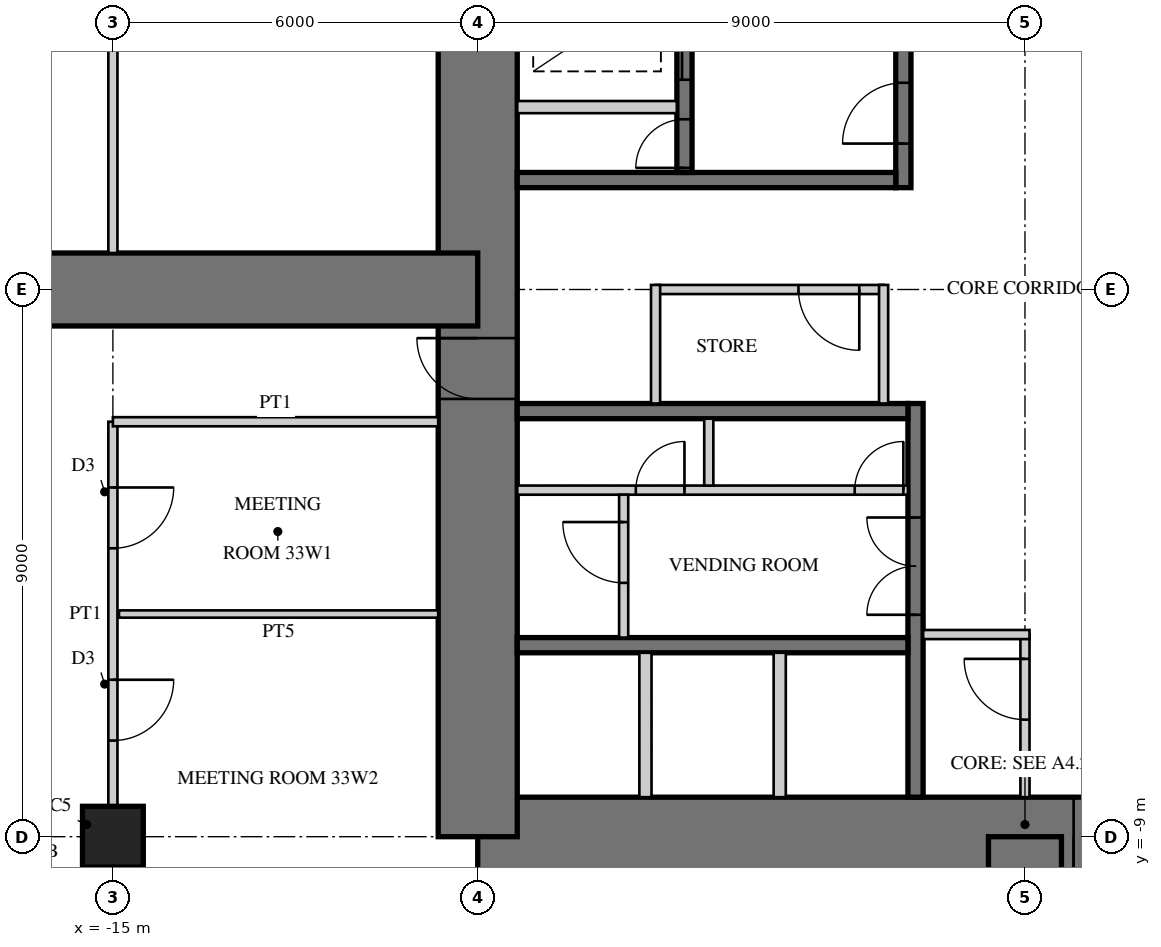
"""IFC4 building model, lengths in metres.
Left out: names, types, materials, properties, quantities, classifications, styles, units other than length and angle.
Written with IfcOpenShell. Run it as: python <this file> out.ifc"""

import sys

from ifc_helpers import new_model, si_unit, direction, frame, frame_2d, origin, origin_2d, place, context, subcontext, project, spatial, rectangle, extrude, element, fill, save


model = new_model("IFC4")
c1 = context("Model", 3, precision=1e-05, world=origin(), true_north=direction((0.0, 1.0)))
c2 = subcontext(c1, "Body", "Model", "MODEL_VIEW")
j1 = project(units=[si_unit("LENGTHUNIT", "METRE"), si_unit("PLANEANGLEUNIT", "RADIAN")], contexts=[c1])
p1 = place(None, origin())
s1 = spatial("IfcSite", under=j1, at=p1, CompositionType="ELEMENT")
p2 = place(p1, origin())
s2 = spatial("IfcBuilding", under=s1, at=p2, CompositionType="ELEMENT")
p3 = place(p2, frame((0.0, 0.0, 136.5)))
s3 = spatial("IfcBuildingStorey", under=s2, at=p3, CompositionType="ELEMENT", Elevation=136.5)
p4 = place(p3, frame((-9.0, -9.0, 0.0), z_axis=(0.0, 0.0, 1.0), x_axis=(1.0, 0.0, 0.0)))
e1 = element("IfcWall", 1, at=p4, inside=s3, PredefinedType="SHEAR", context=c2, shape_type="SweptSolid", body=[
    extrude(rectangle(XDim=18.0, YDim=1.3, at=frame_2d((9.0, 0.0))), origin(), (0.0, 0.0, 1.0), 4.0),
])
p5 = place(p4, frame((9.8, 0.0, 0.0)))
e2 = element("IfcOpeningElement", 2, at=p5, cuts=e1, PredefinedType="OPENING", context=c2, shape_type="SweptSolid", body=[
    extrude(rectangle(XDim=1.0, YDim=2.4, at=frame_2d((0.5, 1.2))), frame((0.0, 0.66, 0.0), z_axis=(0.0, -1.0, 0.0), x_axis=(1.0, 0.0, 0.0)), (0.0, 0.0, 1.0), 1.32),
])
p6 = place(p3, frame((-9.0, 9.0, 0.0), z_axis=(0.0, 0.0, 1.0), x_axis=(0.0, -1.0, 0.0)))
e3 = element("IfcWall", 3, at=p6, inside=s3, PredefinedType="SHEAR", context=c2, shape_type="SweptSolid", body=[
    extrude(rectangle(XDim=18.0, YDim=1.3, at=frame_2d((9.0, 0.0))), origin(), (0.0, 0.0, 1.0), 4.0),
])
p7 = place(p6, frame((9.8, 0.0, 0.0)))
e4 = element("IfcOpeningElement", 4, at=p7, cuts=e3, PredefinedType="OPENING", context=c2, shape_type="SweptSolid", body=[
    extrude(rectangle(XDim=1.0, YDim=2.4, at=frame_2d((0.5, 1.2))), frame((0.0, 0.66, 0.0), z_axis=(0.0, -1.0, 0.0), x_axis=(1.0, 0.0, 0.0)), (0.0, 0.0, 1.0), 1.32),
])
p8 = place(p3, frame((-2.0, 1.675, 0.0), z_axis=(0.0, 0.0, 1.0), x_axis=(0.0, 1.0, 0.0)))
e5 = element("IfcWall", 5, at=p8, inside=s3, PredefinedType="SHEAR", context=c2, shape_type="SweptSolid", body=[
    extrude(rectangle(XDim=6.675, YDim=0.25, at=frame_2d((3.337, 0.0))), origin(), (0.0, 0.0, 1.0), 4.0),
])
p9 = place(p8, frame((0.725, 0.0, 0.0)))
e6 = element("IfcOpeningElement", 6, at=p9, cuts=e5, PredefinedType="OPENING", context=c2, shape_type="SweptSolid", body=[
    extrude(rectangle(XDim=1.0, YDim=2.1, at=frame_2d((0.5, 1.05))), frame((0.0, 0.135, 0.0), z_axis=(0.0, -1.0, 0.0), x_axis=(1.0, 0.0, 0.0)), (0.0, 0.0, 1.0), 0.27),
])
p10 = place(p3, frame((-2.125, 1.8, 0.0), z_axis=(0.0, 0.0, 1.0), x_axis=(-1.0, 0.0, 0.0)))
e7 = element("IfcWall", 7, at=p10, inside=s3, PredefinedType="SHEAR", context=c2, shape_type="SweptSolid", body=[
    extrude(rectangle(XDim=6.225, YDim=0.25, at=frame_2d((3.113, 0.0))), origin(), (0.0, 0.0, 1.0), 4.0),
])
p11 = place(p3, frame((-5.6, 1.925, 0.0), z_axis=(0.0, 0.0, 1.0), x_axis=(0.0, 1.0, 0.0)))
e8 = element("IfcWall", 8, at=p11, inside=s3, PredefinedType="SHEAR", context=c2, shape_type="SweptSolid", body=[
    extrude(rectangle(XDim=3.55, YDim=0.25, at=frame_2d((1.775, 0.0))), origin(), (0.0, 0.0, 1.0), 4.0),
])
p12 = place(p11, frame((1.525, 0.0, 0.0)))
e9 = element("IfcOpeningElement", 9, at=p12, cuts=e8, PredefinedType="OPENING", context=c2, shape_type="SweptSolid", body=[
    extrude(rectangle(XDim=1.1, YDim=2.2, at=frame_2d((0.55, 1.1))), frame((0.0, 0.135, 0.0), z_axis=(0.0, -1.0, 0.0), x_axis=(1.0, 0.0, 0.0)), (0.0, 0.0, 1.0), 0.27),
])
p13 = place(p11, frame((0.075, 0.0, 0.0)))
e10 = element("IfcOpeningElement", 10, at=p13, cuts=e8, PredefinedType="OPENING", context=c2, shape_type="SweptSolid", body=[
    extrude(rectangle(XDim=0.8, YDim=2.1, at=frame_2d((0.4, 1.05))), frame((0.0, 0.135, 0.0), z_axis=(0.0, -1.0, 0.0), x_axis=(1.0, 0.0, 0.0)), (0.0, 0.0, 1.0), 0.27),
])
p14 = place(p3, frame((-5.725, 3.0, 0.0), z_axis=(0.0, 0.0, 1.0), x_axis=(-1.0, 0.0, 0.0)))
e11 = element("IfcWall", 11, at=p14, inside=s3, PredefinedType="PARTITIONING", context=c2, shape_type="SweptSolid", body=[
    extrude(rectangle(XDim=2.625, YDim=0.2, at=frame_2d((1.312, 0.0))), origin(), (0.0, 0.0, 1.0), 4.0),
])
p15 = place(p3, frame((-1.8, -1.875, 0.0), z_axis=(0.0, 0.0, 1.0), x_axis=(0.0, -1.0, 0.0)))
e12 = element("IfcWall", 12, at=p15, inside=s3, PredefinedType="SHEAR", context=c2, shape_type="SweptSolid", body=[
    extrude(rectangle(XDim=6.475, YDim=0.25, at=frame_2d((3.238, 0.0))), origin(), (0.0, 0.0, 1.0), 4.0),
])
p16 = place(p15, frame((1.875, 0.0, 0.0)))
e13 = element("IfcOpeningElement", 13, at=p16, cuts=e12, PredefinedType="OPENING", context=c2, shape_type="SweptSolid", body=[
    extrude(rectangle(XDim=1.6, YDim=2.4, at=frame_2d((0.8, 1.2))), frame((0.0, 0.135, 0.0), z_axis=(0.0, -1.0, 0.0), x_axis=(1.0, 0.0, 0.0)), (0.0, 0.0, 1.0), 0.27),
])
for number, where, z_axis, x_axis in (
    (14, (-1.925, -2.0, 0.0), (0.0, 0.0, 1.0), (-1.0, 0.0, 0.0)),
    (15, (-1.925, -5.85, 0.0), (0.0, 0.0, 1.0), (-1.0, 0.0, 0.0)),
):
    element("IfcWall", number, at=place(p3, frame(where, z_axis=z_axis, x_axis=x_axis)), inside=s3, PredefinedType="SHEAR", context=c2, shape_type="SweptSolid", body=[
        extrude(rectangle(XDim=6.425, YDim=0.25, at=frame_2d((3.212, 0.0))), origin(), (0.0, 0.0, 1.0), 4.0),
    ])
p17 = place(p3, frame((-1.925, -3.3, 0.0), z_axis=(0.0, 0.0, 1.0), x_axis=(-1.0, 0.0, 0.0)))
e16 = element("IfcWall", 16, at=p17, inside=s3, PredefinedType="PARTITIONING", context=c2, shape_type="SweptSolid", body=[
    extrude(rectangle(XDim=6.425, YDim=0.15, at=frame_2d((3.212, 0.0))), origin(), (0.0, 0.0, 1.0), 4.0),
])
p18 = place(p17, frame((0.075, 0.0, 0.0)))
e17 = element("IfcOpeningElement", 17, at=p18, cuts=e16, PredefinedType="OPENING", context=c2, shape_type="SweptSolid", body=[
    extrude(rectangle(XDim=0.8, YDim=2.1, at=frame_2d((0.4, 1.05))), frame((0.0, 0.085, 0.0), z_axis=(0.0, -1.0, 0.0), x_axis=(1.0, 0.0, 0.0)), (0.0, 0.0, 1.0), 0.17),
])
p19 = place(p17, frame((3.675, 0.0, 0.0)))
e18 = element("IfcOpeningElement", 18, at=p19, cuts=e16, PredefinedType="OPENING", context=c2, shape_type="SweptSolid", body=[
    extrude(rectangle(XDim=0.8, YDim=2.1, at=frame_2d((0.4, 1.05))), frame((0.0, 0.085, 0.0), z_axis=(0.0, -1.0, 0.0), x_axis=(1.0, 0.0, 0.0)), (0.0, 0.0, 1.0), 0.17),
])
p20 = place(p3, frame((-5.2, -2.125, 0.0), z_axis=(0.0, 0.0, 1.0), x_axis=(0.0, -1.0, 0.0)))
e19 = element("IfcWall", 19, at=p20, inside=s3, PredefinedType="PARTITIONING", context=c2, shape_type="SweptSolid", body=[
    extrude(rectangle(XDim=1.1, YDim=0.15, at=frame_2d((0.55, 0.0))), origin(), (0.0, 0.0, 1.0), 4.0),
])
for number, where, z_axis, x_axis in (
    (20, (-4.033, -5.975, 0.0), (0.0, 0.0, 1.0), (0.0, -1.0, 0.0)),
    (21, (-6.242, -5.975, 0.0), (0.0, 0.0, 1.0), (0.0, -1.0, 0.0)),
):
    element("IfcWall", number, at=place(p3, frame(where, z_axis=z_axis, x_axis=x_axis)), inside=s3, PredefinedType="PARTITIONING", context=c2, shape_type="SweptSolid", body=[
        extrude(rectangle(XDim=2.375, YDim=0.2, at=frame_2d((1.188, 0.0))), origin(), (0.0, 0.0, 1.0), 4.0),
    ])
p21 = place(p3, frame((0.0, -9.0, 0.0), z_axis=(0.0, 0.0, 1.0), x_axis=(0.0, -1.0, 0.0)))
e22 = element("IfcWall", 22, at=p21, inside=s3, PredefinedType="SHEAR", context=c2, shape_type="SweptSolid", body=[
    extrude(rectangle(XDim=18.0, YDim=1.2, at=frame_2d((9.0, 0.0))), origin(), (0.0, 0.0, 1.0), 4.0),
])
p22 = place(p21, frame((9.8, 0.0, 0.0)))
e23 = element("IfcOpeningElement", 23, at=p22, cuts=e22, PredefinedType="OPENING", context=c2, shape_type="SweptSolid", body=[
    extrude(rectangle(XDim=1.0, YDim=2.2, at=frame_2d((0.5, 1.1))), frame((0.0, 0.61, 0.0), z_axis=(0.0, -1.0, 0.0), x_axis=(1.0, 0.0, 0.0)), (0.0, 0.0, 1.0), 1.22),
])
p23 = place(p3, frame((-9.0, 0.0, 0.0), z_axis=(0.0, 0.0, 1.0), x_axis=(-1.0, 0.0, 0.0)))
e24 = element("IfcWall", 24, at=p23, inside=s3, PredefinedType="SHEAR", context=c2, shape_type="SweptSolid", body=[
    extrude(rectangle(XDim=18.0, YDim=1.2, at=frame_2d((9.0, 0.0))), origin(), (0.0, 0.0, 1.0), 4.0),
])
p24 = place(p23, frame((9.8, 0.0, 0.0)))
e25 = element("IfcOpeningElement", 25, at=p24, cuts=e24, PredefinedType="OPENING", context=c2, shape_type="SweptSolid", body=[
    extrude(rectangle(XDim=1.0, YDim=2.2, at=frame_2d((0.5, 1.1))), frame((0.0, 0.61, 0.0), z_axis=(0.0, -1.0, 0.0), x_axis=(1.0, 0.0, 0.0)), (0.0, 0.0, 1.0), 1.22),
])
p25 = place(p3, frame((-15.0, -9.0, 0.0), z_axis=(0.0, 0.0, 1.0), x_axis=(1.0, 0.0, 0.0)))
e26 = element("IfcColumn", 26, at=p25, inside=s3, PredefinedType="COLUMN", context=c2, shape_type="SweptSolid", body=[
    extrude(rectangle(XDim=1.0, YDim=1.0, at=origin_2d()), origin(), (0.0, 0.0, 1.0), 4.0),
])
p26 = place(p3, frame((-2.325, 0.0, 0.0), z_axis=(0.0, 0.0, 1.0), x_axis=(-1.0, 0.0, 0.0)))
e27 = element("IfcWall", 27, at=p26, inside=s3, PredefinedType="PARTITIONING", context=c2, shape_type="SweptSolid", body=[
    extrude(rectangle(XDim=3.75, YDim=0.15, at=frame_2d((1.875, 0.0))), origin(), (0.0, 0.0, 1.0), 3.8),
])
p27 = place(p26, frame((0.4, 0.0, 0.0)))
e28 = element("IfcOpeningElement", 28, at=p27, cuts=e27, PredefinedType="OPENING", context=c2, shape_type="SweptSolid", body=[
    extrude(rectangle(XDim=1.0, YDim=2.1, at=frame_2d((0.5, 1.05))), frame((0.0, 0.085, 0.0), z_axis=(0.0, -1.0, 0.0), x_axis=(1.0, 0.0, 0.0)), (0.0, 0.0, 1.0), 0.17),
])
for number, where, z_axis, x_axis in (
    (29, (-2.325, -1.875, 0.0), (0.0, 0.0, 1.0), (0.0, 1.0, 0.0)),
    (30, (-6.075, 0.075, 0.0), (0.0, 0.0, 1.0), (0.0, -1.0, 0.0)),
):
    element("IfcWall", number, at=place(p3, frame(where, z_axis=z_axis, x_axis=x_axis)), inside=s3, PredefinedType="PARTITIONING", context=c2, shape_type="SweptSolid", body=[
        extrude(rectangle(XDim=1.95, YDim=0.15, at=frame_2d((0.975, 0.0))), origin(), (0.0, 0.0, 1.0), 3.8),
    ])
p28 = place(p3, frame((0.0, -5.675, 0.0), z_axis=(0.0, 0.0, 1.0), x_axis=(0.0, -1.0, 0.0)))
e31 = element("IfcWall", 31, at=p28, inside=s3, PredefinedType="PARTITIONING", context=c2, shape_type="SweptSolid", body=[
    extrude(rectangle(XDim=2.675, YDim=0.15, at=frame_2d((1.337, 0.0))), origin(), (0.0, 0.0, 1.0), 3.8),
])
p29 = place(p28, frame((0.4, 0.0, 0.0)))
e32 = element("IfcOpeningElement", 32, at=p29, cuts=e31, PredefinedType="OPENING", context=c2, shape_type="SweptSolid", body=[
    extrude(rectangle(XDim=1.0, YDim=2.1, at=frame_2d((0.5, 1.05))), frame((0.0, 0.085, 0.0), z_axis=(0.0, -1.0, 0.0), x_axis=(1.0, 0.0, 0.0)), (0.0, 0.0, 1.0), 0.17),
])
p30 = place(p3, frame((-1.675, -5.675, 0.0), z_axis=(0.0, 0.0, 1.0), x_axis=(1.0, 0.0, 0.0)))
e33 = element("IfcWall", 33, at=p30, inside=s3, PredefinedType="PARTITIONING", context=c2, shape_type="SweptSolid", body=[
    extrude(rectangle(XDim=1.75, YDim=0.15, at=frame_2d((0.875, 0.0))), origin(), (0.0, 0.0, 1.0), 3.8),
])
p31 = place(p3, frame((-6.6, -3.375, 0.0), z_axis=(0.0, 0.0, 1.0), x_axis=(0.0, -1.0, 0.0)))
e34 = element("IfcWall", 34, at=p31, inside=s3, PredefinedType="PARTITIONING", context=c2, shape_type="SweptSolid", body=[
    extrude(rectangle(XDim=2.35, YDim=0.15, at=frame_2d((1.175, 0.0))), origin(), (0.0, 0.0, 1.0), 3.8),
])
p32 = place(p31, frame((0.45, 0.0, 0.0)))
e35 = element("IfcOpeningElement", 35, at=p32, cuts=e34, PredefinedType="OPENING", context=c2, shape_type="SweptSolid", body=[
    extrude(rectangle(XDim=1.0, YDim=2.1, at=frame_2d((0.5, 1.05))), frame((0.0, 0.085, 0.0), z_axis=(0.0, -1.0, 0.0), x_axis=(1.0, 0.0, 0.0)), (0.0, 0.0, 1.0), 0.17),
])
p33 = place(p3, frame((-15.0, -2.175, 0.0), z_axis=(0.0, 0.0, 1.0), x_axis=(0.0, -1.0, 0.0)))
e36 = element("IfcWall", 36, at=p33, inside=s3, PredefinedType="PARTITIONING", context=c2, shape_type="SweptSolid", body=[
    extrude(rectangle(XDim=6.325, YDim=0.15, at=frame_2d((3.163, 0.0))), origin(), (0.0, 0.0, 1.0), 3.0),
])
p34 = place(p33, frame((1.081, 0.0, 0.0)))
e37 = element("IfcOpeningElement", 37, at=p34, cuts=e36, PredefinedType="OPENING", context=c2, shape_type="SweptSolid", body=[
    extrude(rectangle(XDim=1.0, YDim=2.1, at=frame_2d((0.5, 1.05))), frame((0.0, 0.085, 0.0), z_axis=(0.0, -1.0, 0.0), x_axis=(1.0, 0.0, 0.0)), (0.0, 0.0, 1.0), 0.17),
])
p35 = place(p33, frame((4.244, 0.0, 0.0)))
e38 = element("IfcOpeningElement", 38, at=p35, cuts=e36, PredefinedType="OPENING", context=c2, shape_type="SweptSolid", body=[
    extrude(rectangle(XDim=1.0, YDim=2.1, at=frame_2d((0.5, 1.05))), frame((0.0, 0.085, 0.0), z_axis=(0.0, -1.0, 0.0), x_axis=(1.0, 0.0, 0.0)), (0.0, 0.0, 1.0), 0.17),
])
p36 = place(p3, frame((-9.65, -2.175, 0.0), z_axis=(0.0, 0.0, 1.0), x_axis=(-1.0, 0.0, 0.0)))
e39 = element("IfcWall", 39, at=p36, inside=s3, PredefinedType="PARTITIONING", context=c2, shape_type="SweptSolid", body=[
    extrude(rectangle(XDim=5.35, YDim=0.15, at=frame_2d((2.675, 0.0))), origin(), (0.0, 0.0, 1.0), 3.8),
])
p37 = place(p3, frame((-9.65, -5.337, 0.0), z_axis=(0.0, 0.0, 1.0), x_axis=(-1.0, 0.0, 0.0)))
e40 = element("IfcWall", 40, at=p37, inside=s3, PredefinedType="PLUMBINGWALL", context=c2, shape_type="SweptSolid", body=[
    extrude(rectangle(XDim=5.25, YDim=0.12, at=frame_2d((2.625, 0.0))), origin(), (0.0, 0.0, 1.0), 3.8),
])
p38 = place(p3, frame((-15.0, 8.5, 0.0), z_axis=(0.0, 0.0, 1.0), x_axis=(0.0, -1.0, 0.0)))
e41 = element("IfcWall", 41, at=p38, inside=s3, PredefinedType="PARTITIONING", context=c2, shape_type="SweptSolid", body=[
    extrude(rectangle(XDim=7.9, YDim=0.15, at=frame_2d((3.95, 0.0))), origin(), (0.0, 0.0, 1.0), 3.0),
])
p39 = place(p38, frame((3.45, 0.0, 0.0)))
e42 = element("IfcOpeningElement", 42, at=p39, cuts=e41, PredefinedType="OPENING", context=c2, shape_type="SweptSolid", body=[
    extrude(rectangle(XDim=1.0, YDim=2.1, at=frame_2d((0.5, 1.05))), frame((0.0, 0.085, 0.0), z_axis=(0.0, -1.0, 0.0), x_axis=(1.0, 0.0, 0.0)), (0.0, 0.0, 1.0), 0.17),
])
p40 = place(p27, origin())
e43 = element("IfcDoor", 43, at=p40, inside=s3, OperationType="SINGLE_SWING_LEFT", PredefinedType="DOOR", context=c2, shape_type="SweptSolid", body=[
    extrude(rectangle(XDim=1.0, YDim=2.1, at=frame_2d((0.5, 1.05))), frame((0.0, 0.025, 0.0), z_axis=(0.0, -1.0, 0.0), x_axis=(1.0, 0.0, 0.0)), (0.0, 0.0, 1.0), 0.05),
])
fill(e28, e43)
p41 = place(p29, frame((1.0, 0.0, 0.0), z_axis=(0.0, 0.0, 1.0), x_axis=(-1.0, 0.0, 0.0)))
e44 = element("IfcDoor", 44, at=p41, inside=s3, OperationType="SINGLE_SWING_RIGHT", PredefinedType="DOOR", context=c2, shape_type="SweptSolid", body=[
    extrude(rectangle(XDim=1.0, YDim=2.1, at=frame_2d((0.5, 1.05))), frame((0.0, 0.025, 0.0), z_axis=(0.0, -1.0, 0.0), x_axis=(1.0, 0.0, 0.0)), (0.0, 0.0, 1.0), 0.05),
])
fill(e32, e44)
p42 = place(p32, frame((1.0, 0.0, 0.0), z_axis=(0.0, 0.0, 1.0), x_axis=(-1.0, 0.0, 0.0)))
e45 = element("IfcDoor", 45, at=p42, inside=s3, OperationType="SINGLE_SWING_RIGHT", PredefinedType="DOOR", context=c2, shape_type="SweptSolid", body=[
    extrude(rectangle(XDim=1.0, YDim=2.1, at=frame_2d((0.5, 1.05))), frame((0.0, 0.025, 0.0), z_axis=(0.0, -1.0, 0.0), x_axis=(1.0, 0.0, 0.0)), (0.0, 0.0, 1.0), 0.05),
])
fill(e35, e45)
p43 = place(p34, origin())
e46 = element("IfcDoor", 46, at=p43, inside=s3, OperationType="SINGLE_SWING_LEFT", PredefinedType="DOOR", context=c2, shape_type="SweptSolid", body=[
    extrude(rectangle(XDim=1.0, YDim=2.1, at=frame_2d((0.5, 1.05))), frame((0.0, 0.025, 0.0), z_axis=(0.0, -1.0, 0.0), x_axis=(1.0, 0.0, 0.0)), (0.0, 0.0, 1.0), 0.05),
])
fill(e37, e46)
p44 = place(p35, origin())
e47 = element("IfcDoor", 47, at=p44, inside=s3, OperationType="SINGLE_SWING_LEFT", PredefinedType="DOOR", context=c2, shape_type="SweptSolid", body=[
    extrude(rectangle(XDim=1.0, YDim=2.1, at=frame_2d((0.5, 1.05))), frame((0.0, 0.025, 0.0), z_axis=(0.0, -1.0, 0.0), x_axis=(1.0, 0.0, 0.0)), (0.0, 0.0, 1.0), 0.05),
])
fill(e38, e47)
p45 = place(p5, frame((1.0, 0.0, 0.0), z_axis=(0.0, 0.0, 1.0), x_axis=(-1.0, 0.0, 0.0)))
e48 = element("IfcDoor", 48, at=p45, inside=s3, OperationType="SINGLE_SWING_RIGHT", PredefinedType="DOOR", context=c2, shape_type="SweptSolid", body=[
    extrude(rectangle(XDim=1.0, YDim=2.4, at=frame_2d((0.5, 1.2))), frame((0.0, -0.005, 0.0), z_axis=(0.0, -1.0, 0.0), x_axis=(1.0, 0.0, 0.0)), (0.0, 0.0, 1.0), 0.05),
])
fill(e2, e48)
p46 = place(p7, frame((1.0, 0.0, 0.0), z_axis=(0.0, 0.0, 1.0), x_axis=(-1.0, 0.0, 0.0)))
e49 = element("IfcDoor", 49, at=p46, inside=s3, OperationType="SINGLE_SWING_RIGHT", PredefinedType="DOOR", context=c2, shape_type="SweptSolid", body=[
    extrude(rectangle(XDim=1.0, YDim=2.4, at=frame_2d((0.5, 1.2))), frame((0.0, -0.005, 0.0), z_axis=(0.0, -1.0, 0.0), x_axis=(1.0, 0.0, 0.0)), (0.0, 0.0, 1.0), 0.05),
])
fill(e4, e49)
p47 = place(p9, origin())
e50 = element("IfcDoor", 50, at=p47, inside=s3, OperationType="SINGLE_SWING_LEFT", PredefinedType="DOOR", context=c2, shape_type="SweptSolid", body=[
    extrude(rectangle(XDim=1.0, YDim=2.1, at=frame_2d((0.5, 1.05))), frame((0.0, 0.025, 0.0), z_axis=(0.0, -1.0, 0.0), x_axis=(1.0, 0.0, 0.0)), (0.0, 0.0, 1.0), 0.05),
])
fill(e6, e50)
p48 = place(p12, origin())
e51 = element("IfcDoor", 51, at=p48, inside=s3, OperationType="DOUBLE_DOOR_SLIDING", PredefinedType="DOOR", context=c2, shape_type="SweptSolid", body=[
    extrude(rectangle(XDim=1.1, YDim=2.2, at=frame_2d((0.55, 1.1))), frame((0.0, 0.025, 0.0), z_axis=(0.0, -1.0, 0.0), x_axis=(1.0, 0.0, 0.0)), (0.0, 0.0, 1.0), 0.05),
])
fill(e9, e51)
p49 = place(p13, origin())
e52 = element("IfcDoor", 52, at=p49, inside=s3, OperationType="SINGLE_SWING_LEFT", PredefinedType="DOOR", context=c2, shape_type="SweptSolid", body=[
    extrude(rectangle(XDim=0.8, YDim=2.1, at=frame_2d((0.4, 1.05))), frame((0.0, 0.025, 0.0), z_axis=(0.0, -1.0, 0.0), x_axis=(1.0, 0.0, 0.0)), (0.0, 0.0, 1.0), 0.05),
])
fill(e10, e52)
p50 = place(p16, frame((1.6, 0.0, 0.0), z_axis=(0.0, 0.0, 1.0), x_axis=(-1.0, 0.0, 0.0)))
e53 = element("IfcDoor", 53, at=p50, inside=s3, OperationType="DOUBLE_DOOR_SINGLE_SWING", PredefinedType="DOOR", context=c2, shape_type="SweptSolid", body=[
    extrude(rectangle(XDim=1.6, YDim=2.4, at=frame_2d((0.8, 1.2))), frame((0.0, 0.025, 0.0), z_axis=(0.0, -1.0, 0.0), x_axis=(1.0, 0.0, 0.0)), (0.0, 0.0, 1.0), 0.05),
])
fill(e13, e53)
p51 = place(p18, frame((0.8, 0.0, 0.0), z_axis=(0.0, 0.0, 1.0), x_axis=(-1.0, 0.0, 0.0)))
e54 = element("IfcDoor", 54, at=p51, inside=s3, OperationType="SINGLE_SWING_RIGHT", PredefinedType="DOOR", context=c2, shape_type="SweptSolid", body=[
    extrude(rectangle(XDim=0.8, YDim=2.1, at=frame_2d((0.4, 1.05))), frame((0.0, 0.025, 0.0), z_axis=(0.0, -1.0, 0.0), x_axis=(1.0, 0.0, 0.0)), (0.0, 0.0, 1.0), 0.05),
])
fill(e17, e54)
p52 = place(p19, frame((0.8, 0.0, 0.0), z_axis=(0.0, 0.0, 1.0), x_axis=(-1.0, 0.0, 0.0)))
e55 = element("IfcDoor", 55, at=p52, inside=s3, OperationType="SINGLE_SWING_RIGHT", PredefinedType="DOOR", context=c2, shape_type="SweptSolid", body=[
    extrude(rectangle(XDim=0.8, YDim=2.1, at=frame_2d((0.4, 1.05))), frame((0.0, 0.025, 0.0), z_axis=(0.0, -1.0, 0.0), x_axis=(1.0, 0.0, 0.0)), (0.0, 0.0, 1.0), 0.05),
])
fill(e18, e55)
save(model, sys.argv[1])
